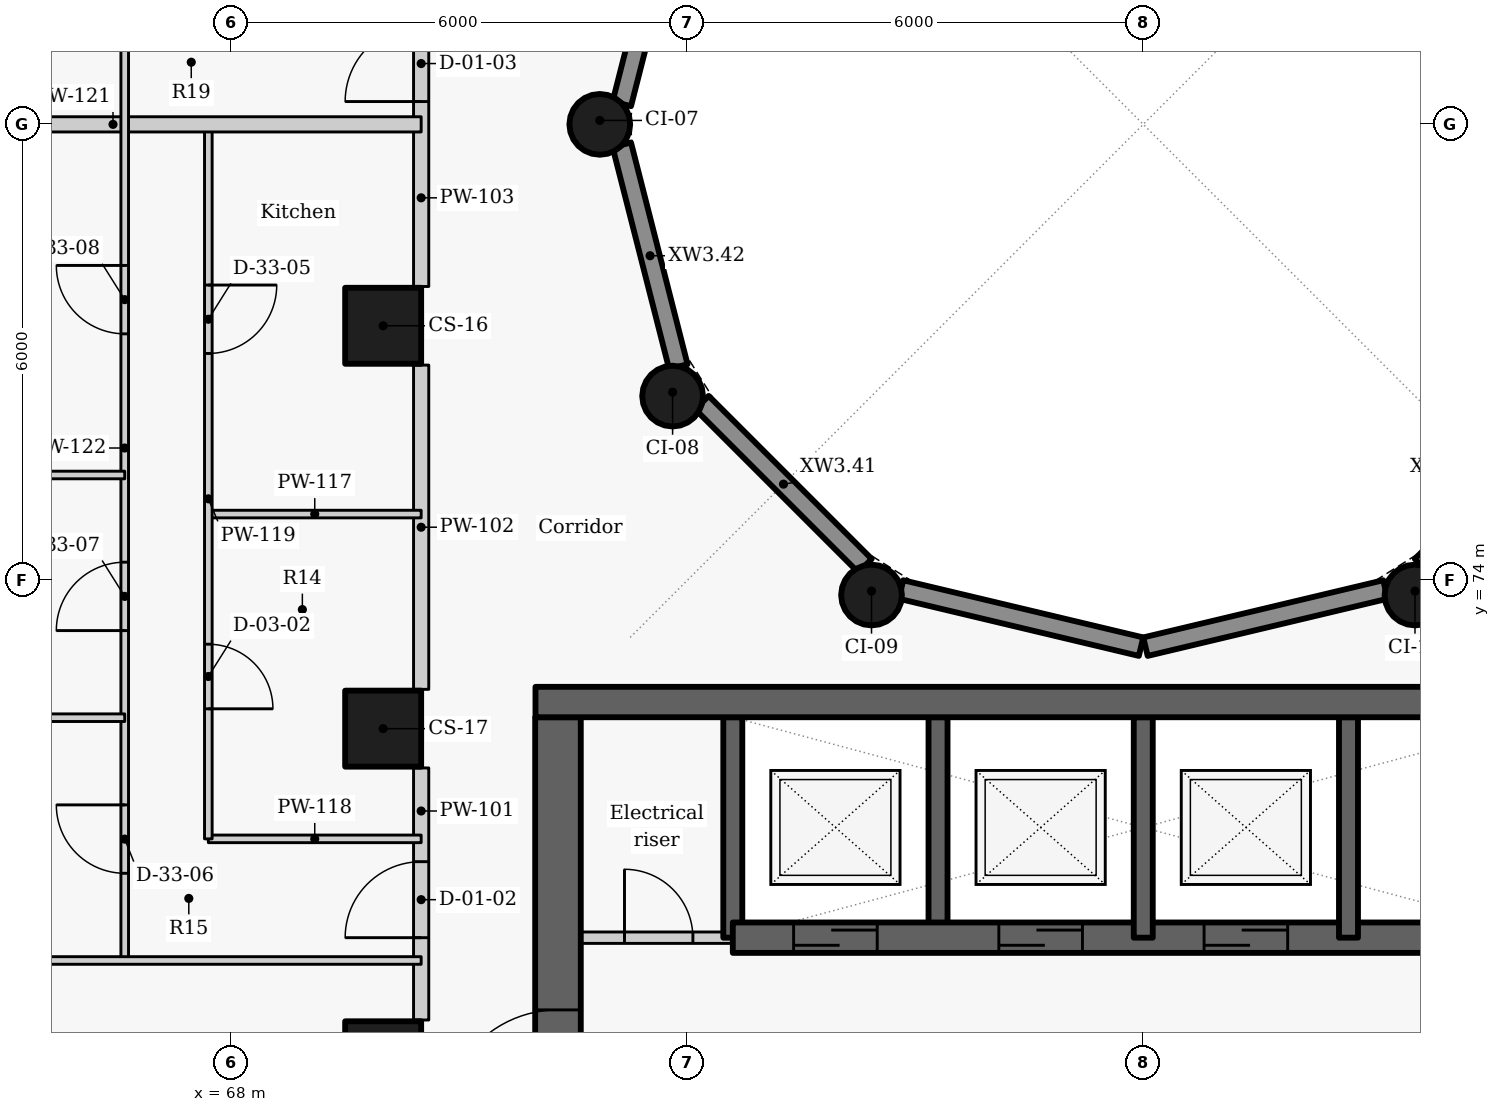
"""IFC4 building model, lengths in metres.
Left out: names, types, materials, properties, quantities, classifications, styles, units other than length and angle.
Written with IfcOpenShell. Run it as: python <this file> out.ifc"""

import sys

from ifc_helpers import new_model, si_unit, direction, frame, frame_2d, origin, origin_2d, place, context, subcontext, project, spatial, rectangle, circle, extrude, element, fill, save


model = new_model("IFC4")
c1 = context("Model", 3, precision=1e-05, world=origin(), true_north=direction((0.0, 1.0)))
c2 = subcontext(c1, "Body", "Model", "MODEL_VIEW")
j1 = project(units=[si_unit("LENGTHUNIT", "METRE"), si_unit("PLANEANGLEUNIT", "RADIAN")], contexts=[c1])
p1 = place(None, origin())
s1 = spatial("IfcSite", under=j1, at=p1, CompositionType="ELEMENT")
p2 = place(p1, origin())
s2 = spatial("IfcBuilding", under=s1, at=p2, CompositionType="ELEMENT")
p3 = place(p2, frame((0.0, 0.0, 107.4)))
s3 = spatial("IfcBuildingStorey", under=s2, at=p3, CompositionType="ELEMENT", Elevation=107.4)
for number, where, z_axis, x_axis in (
    (1, (70.0, 77.35, 0.0), (0.0, 0.0, 1.0), (0.0, -1.0, 0.0)),
    (2, (70.0, 72.05, 0.0), (0.0, 0.0, 1.0), (0.0, -1.0, 0.0)),
    (3, (70.0, 67.7, 0.0), (0.0, 0.0, 1.0), (0.0, -1.0, 0.0)),
):
    element("IfcColumn", number, at=place(p3, frame(where, z_axis=z_axis, x_axis=x_axis)), inside=s3, PredefinedType="COLUMN", context=c2, shape_type="SweptSolid", body=[
        extrude(rectangle(XDim=1.0, YDim=1.0, at=origin_2d()), origin(), (0.0, 0.0, 1.0), 3.3),
    ])
for number, where, z_axis, x_axis in (
    (4, (72.85, 80.0, 0.0), (0.0, 0.0, 1.0), (0.0, -1.0, 0.0)),
    (5, (73.808, 76.425, 0.0), (0.0, 0.0, 1.0), (0.5, -0.866, 0.0)),
    (6, (76.425, 73.808, 0.0), (0.0, 0.0, 1.0), (0.866, -0.5, 0.0)),
    (7, (83.575, 73.808, 0.0), (0.0, 0.0, 1.0), (0.866, 0.5, 0.0)),
):
    element("IfcColumn", number, at=place(p3, frame(where, z_axis=z_axis, x_axis=x_axis)), inside=s3, PredefinedType="COLUMN", context=c2, shape_type="SweptSolid", body=[
        extrude(circle(Radius=0.4, at=origin_2d()), origin(), (0.0, 0.0, 1.0), 3.3),
    ])
p4 = place(p3, frame((85.806, 76.339, 0.0), z_axis=(0.0, 0.0, 1.0), x_axis=(-0.707106781187, -0.707106781187, 0.0)))
e8 = element("IfcWall", 8, at=p4, inside=s3, PredefinedType="SOLIDWALL", context=c2, shape_type="SweptSolid", body=[
    extrude(rectangle(XDim=3.033, YDim=0.25, at=frame_2d((1.517, 0.0))), origin(), (0.0, 0.0, 1.0), 2.425),
])
for number, where, z_axis, x_axis in (
    (9, (83.186, 73.881, 0.0), (0.0, 0.0, 1.0), (-0.973, -0.232, 0.0)),
    (10, (79.971, 73.128, 0.0), (0.0, 0.0, 1.0), (-0.973, 0.232, 0.0)),
):
    element("IfcWall", number, at=place(p3, frame(where, z_axis=z_axis, x_axis=x_axis)), inside=s3, PredefinedType="SOLIDWALL", context=c2, shape_type="SweptSolid", body=[
        extrude(rectangle(XDim=3.246, YDim=0.25, at=frame_2d((1.623, 0.0))), origin(), (0.0, 0.0, 1.0), 2.425),
    ])
p5 = place(p3, frame((76.339, 74.194, 0.0), z_axis=(0.0, 0.0, 1.0), x_axis=(-0.707106781187, 0.707106781187, 0.0)))
e11 = element("IfcWall", 11, at=p5, inside=s3, PredefinedType="SOLIDWALL", context=c2, shape_type="SweptSolid", body=[
    extrude(rectangle(XDim=3.033, YDim=0.25, at=frame_2d((1.517, 0.0))), origin(), (0.0, 0.0, 1.0), 2.425),
])
for number, where, z_axis, x_axis in (
    (12, (73.883, 76.813, 0.0), (0.0, 0.0, 1.0), (-0.247, 0.969, 0.0)),
    (13, (73.14, 80.27, 0.0), (0.0, 0.0, 1.0), (0.247, 0.969, 0.0)),
):
    element("IfcWall", number, at=place(p3, frame(where, z_axis=z_axis, x_axis=x_axis)), inside=s3, PredefinedType="SOLIDWALL", context=c2, shape_type="SweptSolid", body=[
        extrude(rectangle(XDim=3.01, YDim=0.25, at=frame_2d((1.505, 0.0))), origin(), (0.0, 0.0, 1.0), 2.425),
    ])
p6 = place(p3, frame((74.6, 69.3, -0.275), z_axis=(0.0, 0.0, 1.0), x_axis=(0.0, 1.0, 0.0)))
e14 = element("IfcWall", 14, at=p6, inside=s3, PredefinedType="SHEAR", context=c2, shape_type="SweptSolid", body=[
    extrude(rectangle(XDim=2.9, YDim=0.25, at=frame_2d((1.45, 0.0))), origin(), (0.0, 0.0, 1.0), 3.3),
])
p7 = place(p3, frame((72.0, 69.3, 0.0), z_axis=(0.0, 0.0, 1.0), x_axis=(1.0, 0.0, 0.0)))
e15 = element("IfcWall", 15, at=p7, inside=s3, PredefinedType="PARTITIONING", context=c2, shape_type="SweptSolid", body=[
    extrude(rectangle(XDim=2.6, YDim=0.15, at=frame_2d((1.3, 0.0))), origin(), (0.0, 0.0, 1.0), 3.025),
])
p8 = place(p7, frame((1.175, 0.0, 0.0)))
e16 = element("IfcOpeningElement", 16, at=p8, cuts=e15, PredefinedType="OPENING", context=c2, shape_type="SweptSolid", body=[
    extrude(rectangle(XDim=0.9, YDim=2.1, at=frame_2d((0.45, 1.05))), frame((0.0, 0.085, 0.0), z_axis=(0.0, -1.0, 0.0), x_axis=(1.0, 0.0, 0.0)), (0.0, 0.0, 1.0), 0.17),
])
p9 = place(p3, frame((72.3, 63.1, -0.275), z_axis=(0.0, 0.0, 1.0), x_axis=(0.0, 1.0, 0.0)))
e17 = element("IfcWall", 17, at=p9, inside=s3, PredefinedType="SHEAR", context=c2, shape_type="SweptSolid", body=[
    extrude(rectangle(XDim=9.1, YDim=0.6, at=frame_2d((4.55, 0.0))), origin(), (0.0, 0.0, 1.0), 3.3),
])
p10 = place(p9, frame((3.75, 0.0, 0.275)))
e18 = element("IfcOpeningElement", 18, at=p10, cuts=e17, PredefinedType="OPENING", context=c2, shape_type="SweptSolid", body=[
    extrude(rectangle(XDim=1.5, YDim=2.1, at=frame_2d((0.75, 1.05))), frame((0.0, 0.31, 0.0), z_axis=(0.0, -1.0, 0.0), x_axis=(1.0, 0.0, 0.0)), (0.0, 0.0, 1.0), 0.62),
])
p11 = place(p3, frame((77.3, 69.3, -0.275), z_axis=(0.0, 0.0, 1.0), x_axis=(0.0, 1.0, 0.0)))
e19 = element("IfcWall", 19, at=p11, inside=s3, PredefinedType="SHEAR", context=c2, shape_type="SweptSolid", body=[
    extrude(rectangle(XDim=2.9, YDim=0.25, at=frame_2d((1.45, 0.0))), origin(), (0.0, 0.0, 1.0), 3.3),
])
p12 = place(p3, frame((74.6, 69.3, -0.275), z_axis=(0.0, 0.0, 1.0), x_axis=(1.0, 0.0, 0.0)))
e20 = element("IfcWall", 20, at=p12, inside=s3, PredefinedType="SHEAR", context=c2, shape_type="SweptSolid", body=[
    extrude(rectangle(XDim=10.8, YDim=0.4, at=frame_2d((5.4, 0.0))), origin(), (0.0, 0.0, 1.0), 3.3),
])
p13 = place(p12, frame((0.8, 0.0, 0.275)))
e21 = element("IfcOpeningElement", 21, at=p13, cuts=e20, PredefinedType="OPENING", context=c2, shape_type="SweptSolid", body=[
    extrude(rectangle(XDim=1.1, YDim=2.1, at=frame_2d((0.55, 1.05))), frame((0.0, 0.21, 0.0), z_axis=(0.0, -1.0, 0.0), x_axis=(1.0, 0.0, 0.0)), (0.0, 0.0, 1.0), 0.42),
])
p14 = place(p12, frame((3.5, 0.0, 0.275)))
e22 = element("IfcOpeningElement", 22, at=p14, cuts=e20, PredefinedType="OPENING", context=c2, shape_type="SweptSolid", body=[
    extrude(rectangle(XDim=1.1, YDim=2.1, at=frame_2d((0.55, 1.05))), frame((0.0, 0.21, 0.0), z_axis=(0.0, -1.0, 0.0), x_axis=(1.0, 0.0, 0.0)), (0.0, 0.0, 1.0), 0.42),
])
p15 = place(p12, frame((6.2, 0.0, 0.275)))
e23 = element("IfcOpeningElement", 23, at=p15, cuts=e20, PredefinedType="OPENING", context=c2, shape_type="SweptSolid", body=[
    extrude(rectangle(XDim=1.1, YDim=2.1, at=frame_2d((0.55, 1.05))), frame((0.0, 0.21, 0.0), z_axis=(0.0, -1.0, 0.0), x_axis=(1.0, 0.0, 0.0)), (0.0, 0.0, 1.0), 0.42),
])
for number, where, z_axis, x_axis in (
    (24, (80.0, 69.3, -0.275), (0.0, 0.0, 1.0), (0.0, 1.0, 0.0)),
    (25, (82.7, 69.3, -0.275), (0.0, 0.0, 1.0), (0.0, 1.0, 0.0)),
):
    element("IfcWall", number, at=place(p3, frame(where, z_axis=z_axis, x_axis=x_axis)), inside=s3, PredefinedType="SHEAR", context=c2, shape_type="SweptSolid", body=[
        extrude(rectangle(XDim=2.9, YDim=0.25, at=frame_2d((1.45, 0.0))), origin(), (0.0, 0.0, 1.0), 3.3),
    ])
p16 = place(p3, frame((70.5, 68.217, 0.0), z_axis=(0.0, 0.0, 1.0), x_axis=(0.0, 1.0, 0.0)))
e26 = element("IfcWall", 26, at=p16, inside=s3, PredefinedType="PARTITIONING", context=c2, shape_type="SweptSolid", body=[
    extrude(rectangle(XDim=3.316, YDim=0.2, at=frame_2d((1.658, 0.0))), origin(), (0.0, 0.0, 1.0), 3.025),
])
p17 = place(p16, frame((1.083, 0.0, 0.0)))
e27 = element("IfcOpeningElement", 27, at=p17, cuts=e26, PredefinedType="OPENING", context=c2, shape_type="SweptSolid", body=[
    extrude(rectangle(XDim=1.0, YDim=2.1, at=frame_2d((0.5, 1.05))), frame((0.0, 0.11, 0.0), z_axis=(0.0, -1.0, 0.0), x_axis=(1.0, 0.0, 0.0)), (0.0, 0.0, 1.0), 0.22),
])
p18 = place(p3, frame((70.5, 72.567, 0.0), z_axis=(0.0, 0.0, 1.0), x_axis=(0.0, 1.0, 0.0)))
e28 = element("IfcWall", 28, at=p18, inside=s3, PredefinedType="PARTITIONING", context=c2, shape_type="SweptSolid", body=[
    extrude(rectangle(XDim=4.266, YDim=0.2, at=frame_2d((2.133, 0.0))), origin(), (0.0, 0.0, 1.0), 3.025),
])
p19 = place(p3, frame((70.5, 77.867, 0.0), z_axis=(0.0, 0.0, 1.0), x_axis=(0.0, 1.0, 0.0)))
e29 = element("IfcWall", 29, at=p19, inside=s3, PredefinedType="PARTITIONING", context=c2, shape_type="SweptSolid", body=[
    extrude(rectangle(XDim=4.266, YDim=0.2, at=frame_2d((2.133, 0.0))), origin(), (0.0, 0.0, 1.0), 3.025),
])
p20 = place(p19, frame((2.433, 0.0, 0.0)))
e30 = element("IfcOpeningElement", 30, at=p20, cuts=e29, PredefinedType="OPENING", context=c2, shape_type="SweptSolid", body=[
    extrude(rectangle(XDim=1.0, YDim=2.1, at=frame_2d((0.5, 1.05))), frame((0.0, 0.11, 0.0), z_axis=(0.0, -1.0, 0.0), x_axis=(1.0, 0.0, 0.0)), (0.0, 0.0, 1.0), 0.22),
])
for number, where, z_axis, x_axis in (
    (31, (67.7, 74.873, 0.0), (0.0, 0.0, 1.0), (1.0, 0.0, 0.0)),
    (32, (67.7, 70.6, 0.0), (0.0, 0.0, 1.0), (1.0, 0.0, 0.0)),
):
    element("IfcWall", number, at=place(p3, frame(where, z_axis=z_axis, x_axis=x_axis)), inside=s3, PredefinedType="PARTITIONING", context=c2, shape_type="SweptSolid", body=[
        extrude(rectangle(XDim=2.8, YDim=0.1, at=frame_2d((1.4, 0.0))), origin(), (0.0, 0.0, 1.0), 2.505),
    ])
p21 = place(p3, frame((67.7, 80.0, 0.0), z_axis=(0.0, 0.0, 1.0), x_axis=(0.0, -1.0, 0.0)))
e33 = element("IfcWall", 33, at=p21, inside=s3, PredefinedType="PARTITIONING", context=c2, shape_type="SweptSolid", body=[
    extrude(rectangle(XDim=9.4, YDim=0.1, at=frame_2d((4.7, 0.0))), origin(), (0.0, 0.0, 1.0), 3.025),
])
p22 = place(p21, frame((6.839, 0.0, 0.0)))
e34 = element("IfcOpeningElement", 34, at=p22, cuts=e33, PredefinedType="OPENING", context=c2, shape_type="SweptSolid", body=[
    extrude(rectangle(XDim=0.85, YDim=2.1, at=frame_2d((0.425, 1.05))), frame((0.0, 0.06, 0.0), z_axis=(0.0, -1.0, 0.0), x_axis=(1.0, 0.0, 0.0)), (0.0, 0.0, 1.0), 0.12),
])
p23 = place(p21, frame((2.114, 0.0, 0.0)))
e35 = element("IfcOpeningElement", 35, at=p23, cuts=e33, PredefinedType="OPENING", context=c2, shape_type="SweptSolid", body=[
    extrude(rectangle(XDim=0.9, YDim=2.1, at=frame_2d((0.45, 1.05))), frame((0.0, 0.06, 0.0), z_axis=(0.0, -1.0, 0.0), x_axis=(1.0, 0.0, 0.0)), (0.0, 0.0, 1.0), 0.12),
])
p24 = place(p3, frame((62.392, 80.0, 0.0), z_axis=(0.0, 0.0, 1.0), x_axis=(1.0, 0.0, 0.0)))
e36 = element("IfcWall", 36, at=p24, inside=s3, PredefinedType="PARTITIONING", context=c2, shape_type="SweptSolid", body=[
    extrude(rectangle(XDim=8.108, YDim=0.2, at=frame_2d((4.054, 0.0))), origin(), (0.0, 0.0, 1.0), 2.405),
])
p25 = place(p3, frame((66.6, 69.0, 0.0), z_axis=(0.0, 0.0, 1.0), x_axis=(0.0, 1.0, 0.0)))
e37 = element("IfcWall", 37, at=p25, inside=s3, PredefinedType="PARTITIONING", context=c2, shape_type="SweptSolid", body=[
    extrude(rectangle(XDim=24.2, YDim=0.1, at=frame_2d((12.1, 0.0))), origin(), (0.0, 0.0, 1.0), 3.025),
])
p26 = place(p25, frame((1.147, 0.0, 0.0)))
e38 = element("IfcOpeningElement", 38, at=p26, cuts=e37, PredefinedType="OPENING", context=c2, shape_type="SweptSolid", body=[
    extrude(rectangle(XDim=0.9, YDim=2.1, at=frame_2d((0.45, 1.05))), frame((0.0, 0.06, 0.0), z_axis=(0.0, -1.0, 0.0), x_axis=(1.0, 0.0, 0.0)), (0.0, 0.0, 1.0), 0.12),
])
p27 = place(p25, frame((4.34, 0.0, 0.0)))
e39 = element("IfcOpeningElement", 39, at=p27, cuts=e37, PredefinedType="OPENING", context=c2, shape_type="SweptSolid", body=[
    extrude(rectangle(XDim=0.9, YDim=2.1, at=frame_2d((0.45, 1.05))), frame((0.0, 0.06, 0.0), z_axis=(0.0, -1.0, 0.0), x_axis=(1.0, 0.0, 0.0)), (0.0, 0.0, 1.0), 0.12),
])
p28 = place(p25, frame((8.244, 0.0, 0.0)))
e40 = element("IfcOpeningElement", 40, at=p28, cuts=e37, PredefinedType="OPENING", context=c2, shape_type="SweptSolid", body=[
    extrude(rectangle(XDim=0.9, YDim=2.1, at=frame_2d((0.45, 1.05))), frame((0.0, 0.06, 0.0), z_axis=(0.0, -1.0, 0.0), x_axis=(1.0, 0.0, 0.0)), (0.0, 0.0, 1.0), 0.12),
])
p29 = place(p25, frame((11.999, 0.0, 0.0)))
e41 = element("IfcOpeningElement", 41, at=p29, cuts=e37, PredefinedType="OPENING", context=c2, shape_type="SweptSolid", body=[
    extrude(rectangle(XDim=0.9, YDim=2.1, at=frame_2d((0.45, 1.05))), frame((0.0, 0.06, 0.0), z_axis=(0.0, -1.0, 0.0), x_axis=(1.0, 0.0, 0.0)), (0.0, 0.0, 1.0), 0.12),
])
p30 = place(p25, frame((14.896, 0.0, 0.0)))
e42 = element("IfcOpeningElement", 42, at=p30, cuts=e37, PredefinedType="OPENING", context=c2, shape_type="SweptSolid", body=[
    extrude(rectangle(XDim=0.9, YDim=2.1, at=frame_2d((0.45, 1.05))), frame((0.0, 0.06, 0.0), z_axis=(0.0, -1.0, 0.0), x_axis=(1.0, 0.0, 0.0)), (0.0, 0.0, 1.0), 0.12),
])
p31 = place(p25, frame((17.794, 0.0, 0.0)))
e43 = element("IfcOpeningElement", 43, at=p31, cuts=e37, PredefinedType="OPENING", context=c2, shape_type="SweptSolid", body=[
    extrude(rectangle(XDim=0.9, YDim=2.1, at=frame_2d((0.45, 1.05))), frame((0.0, 0.06, 0.0), z_axis=(0.0, -1.0, 0.0), x_axis=(1.0, 0.0, 0.0)), (0.0, 0.0, 1.0), 0.12),
])
p32 = place(p25, frame((21.496, 0.0, 0.0)))
e44 = element("IfcOpeningElement", 44, at=p32, cuts=e37, PredefinedType="OPENING", context=c2, shape_type="SweptSolid", body=[
    extrude(rectangle(XDim=0.9, YDim=2.1, at=frame_2d((0.45, 1.05))), frame((0.0, 0.06, 0.0), z_axis=(0.0, -1.0, 0.0), x_axis=(1.0, 0.0, 0.0)), (0.0, 0.0, 1.0), 0.12),
])
p33 = place(p3, frame((58.985, 69.0, 0.0), z_axis=(0.0, 0.0, 1.0), x_axis=(1.0, 0.0, 0.0)))
e45 = element("IfcWall", 45, at=p33, inside=s3, PredefinedType="PARTITIONING", context=c2, shape_type="SweptSolid", body=[
    extrude(rectangle(XDim=11.515, YDim=0.1, at=frame_2d((5.758, 0.0))), origin(), (0.0, 0.0, 1.0), 2.405),
])
p34 = place(p3, frame((57.856, 72.194, 0.0), z_axis=(0.0, 0.0, 1.0), x_axis=(1.0, 0.0, 0.0)))
e46 = element("IfcWall", 46, at=p34, inside=s3, PredefinedType="PARTITIONING", context=c2, shape_type="SweptSolid", body=[
    extrude(rectangle(XDim=8.744, YDim=0.1, at=frame_2d((4.372, 0.0))), origin(), (0.0, 0.0, 1.0), 3.025),
])
p35 = place(p3, frame((55.297, 75.387, 0.0), z_axis=(0.0, 0.0, 1.0), x_axis=(1.0, 0.0, 0.0)))
e47 = element("IfcWall", 47, at=p35, inside=s3, PredefinedType="PARTITIONING", context=c2, shape_type="SweptSolid", body=[
    extrude(rectangle(XDim=11.303, YDim=0.1, at=frame_2d((5.652, 0.0))), origin(), (0.0, 0.0, 1.0), 2.405),
])
p36 = place(p3, frame((72.004, 72.4, -0.275), z_axis=(0.0, 0.0, 1.0), x_axis=(1.0, 0.0, 0.0)))
e48 = element("IfcWall", 48, at=p36, inside=s3, PredefinedType="SHEAR", context=c2, shape_type="SweptSolid", body=[
    extrude(rectangle(XDim=15.992, YDim=0.4, at=frame_2d((7.996, 0.0))), origin(), (0.0, 0.0, 1.0), 3.3),
])
p37 = place(p8, origin())
e49 = element("IfcDoor", 49, at=p37, inside=s3, OperationType="SINGLE_SWING_LEFT", PredefinedType="DOOR", context=c2, shape_type="SweptSolid", body=[
    extrude(rectangle(XDim=0.9, YDim=2.1, at=frame_2d((0.45, 1.05))), frame((0.0, 0.025, 0.0), z_axis=(0.0, -1.0, 0.0), x_axis=(1.0, 0.0, 0.0)), (0.0, 0.0, 1.0), 0.05),
])
fill(e16, e49)
p38 = place(p13, origin())
e50 = element("IfcDoor", 50, at=p38, inside=s3, OperationType="SLIDING_TO_LEFT", PredefinedType="DOOR", context=c2, shape_type="SweptSolid", body=[
    extrude(rectangle(XDim=1.1, YDim=2.1, at=frame_2d((0.55, 1.05))), frame((0.0, 0.025, 0.0), z_axis=(0.0, -1.0, 0.0), x_axis=(1.0, 0.0, 0.0)), (0.0, 0.0, 1.0), 0.05),
])
fill(e21, e50)
p39 = place(p14, origin())
e51 = element("IfcDoor", 51, at=p39, inside=s3, OperationType="SLIDING_TO_LEFT", PredefinedType="DOOR", context=c2, shape_type="SweptSolid", body=[
    extrude(rectangle(XDim=1.1, YDim=2.1, at=frame_2d((0.55, 1.05))), frame((0.0, 0.025, 0.0), z_axis=(0.0, -1.0, 0.0), x_axis=(1.0, 0.0, 0.0)), (0.0, 0.0, 1.0), 0.05),
])
fill(e22, e51)
p40 = place(p15, origin())
e52 = element("IfcDoor", 52, at=p40, inside=s3, OperationType="SLIDING_TO_LEFT", PredefinedType="DOOR", context=c2, shape_type="SweptSolid", body=[
    extrude(rectangle(XDim=1.1, YDim=2.1, at=frame_2d((0.55, 1.05))), frame((0.0, 0.025, 0.0), z_axis=(0.0, -1.0, 0.0), x_axis=(1.0, 0.0, 0.0)), (0.0, 0.0, 1.0), 0.05),
])
fill(e23, e52)
p41 = place(p17, origin())
e53 = element("IfcDoor", 53, at=p41, inside=s3, OperationType="SINGLE_SWING_LEFT", PredefinedType="DOOR", context=c2, shape_type="SweptSolid", body=[
    extrude(rectangle(XDim=1.0, YDim=2.1, at=frame_2d((0.5, 1.05))), frame((0.0, 0.025, 0.0), z_axis=(0.0, -1.0, 0.0), x_axis=(1.0, 0.0, 0.0)), (0.0, 0.0, 1.0), 0.05),
])
fill(e27, e53)
p42 = place(p22, origin())
e54 = element("IfcDoor", 54, at=p42, inside=s3, OperationType="SINGLE_SWING_RIGHT", PredefinedType="DOOR", context=c2, shape_type="SweptSolid", body=[
    extrude(rectangle(XDim=0.85, YDim=2.1, at=frame_2d((0.425, 1.05))), frame((0.0, 0.025, 0.0), z_axis=(0.0, -1.0, 0.0), x_axis=(1.0, 0.0, 0.0)), (0.0, 0.0, 1.0), 0.05),
])
fill(e34, e54)
p43 = place(p23, origin())
e55 = element("IfcDoor", 55, at=p43, inside=s3, OperationType="SINGLE_SWING_LEFT", PredefinedType="DOOR", context=c2, shape_type="SweptSolid", body=[
    extrude(rectangle(XDim=0.9, YDim=2.1, at=frame_2d((0.45, 1.05))), frame((0.0, 0.025, 0.0), z_axis=(0.0, -1.0, 0.0), x_axis=(1.0, 0.0, 0.0)), (0.0, 0.0, 1.0), 0.05),
])
fill(e35, e55)
p44 = place(p26, origin())
e56 = element("IfcDoor", 56, at=p44, inside=s3, OperationType="SINGLE_SWING_RIGHT", PredefinedType="DOOR", context=c2, shape_type="SweptSolid", body=[
    extrude(rectangle(XDim=0.9, YDim=2.1, at=frame_2d((0.45, 1.05))), frame((0.0, 0.025, 0.0), z_axis=(0.0, -1.0, 0.0), x_axis=(1.0, 0.0, 0.0)), (0.0, 0.0, 1.0), 0.05),
])
fill(e38, e56)
p45 = place(p27, origin())
e57 = element("IfcDoor", 57, at=p45, inside=s3, OperationType="SINGLE_SWING_LEFT", PredefinedType="DOOR", context=c2, shape_type="SweptSolid", body=[
    extrude(rectangle(XDim=0.9, YDim=2.1, at=frame_2d((0.45, 1.05))), frame((0.0, 0.025, 0.0), z_axis=(0.0, -1.0, 0.0), x_axis=(1.0, 0.0, 0.0)), (0.0, 0.0, 1.0), 0.05),
])
fill(e39, e57)
p46 = place(p28, origin())
e58 = element("IfcDoor", 58, at=p46, inside=s3, OperationType="SINGLE_SWING_RIGHT", PredefinedType="DOOR", context=c2, shape_type="SweptSolid", body=[
    extrude(rectangle(XDim=0.9, YDim=2.1, at=frame_2d((0.45, 1.05))), frame((0.0, 0.025, 0.0), z_axis=(0.0, -1.0, 0.0), x_axis=(1.0, 0.0, 0.0)), (0.0, 0.0, 1.0), 0.05),
])
fill(e40, e58)
p47 = place(p20, origin())
e59 = element("IfcDoor", 59, at=p47, inside=s3, OperationType="SINGLE_SWING_LEFT", PredefinedType="DOOR", context=c2, shape_type="SweptSolid", body=[
    extrude(rectangle(XDim=1.0, YDim=2.1, at=frame_2d((0.5, 1.05))), frame((0.0, 0.025, 0.0), z_axis=(0.0, -1.0, 0.0), x_axis=(1.0, 0.0, 0.0)), (0.0, 0.0, 1.0), 0.05),
])
fill(e30, e59)
p48 = place(p10, origin())
e60 = element("IfcDoor", 60, at=p48, inside=s3, OperationType="DOUBLE_DOOR_SINGLE_SWING", PredefinedType="DOOR", context=c2, shape_type="SweptSolid", body=[
    extrude(rectangle(XDim=1.5, YDim=2.1, at=frame_2d((0.75, 1.05))), frame((0.0, 0.025, 0.0), z_axis=(0.0, -1.0, 0.0), x_axis=(1.0, 0.0, 0.0)), (0.0, 0.0, 1.0), 0.05),
])
fill(e18, e60)
save(model, sys.argv[1])
